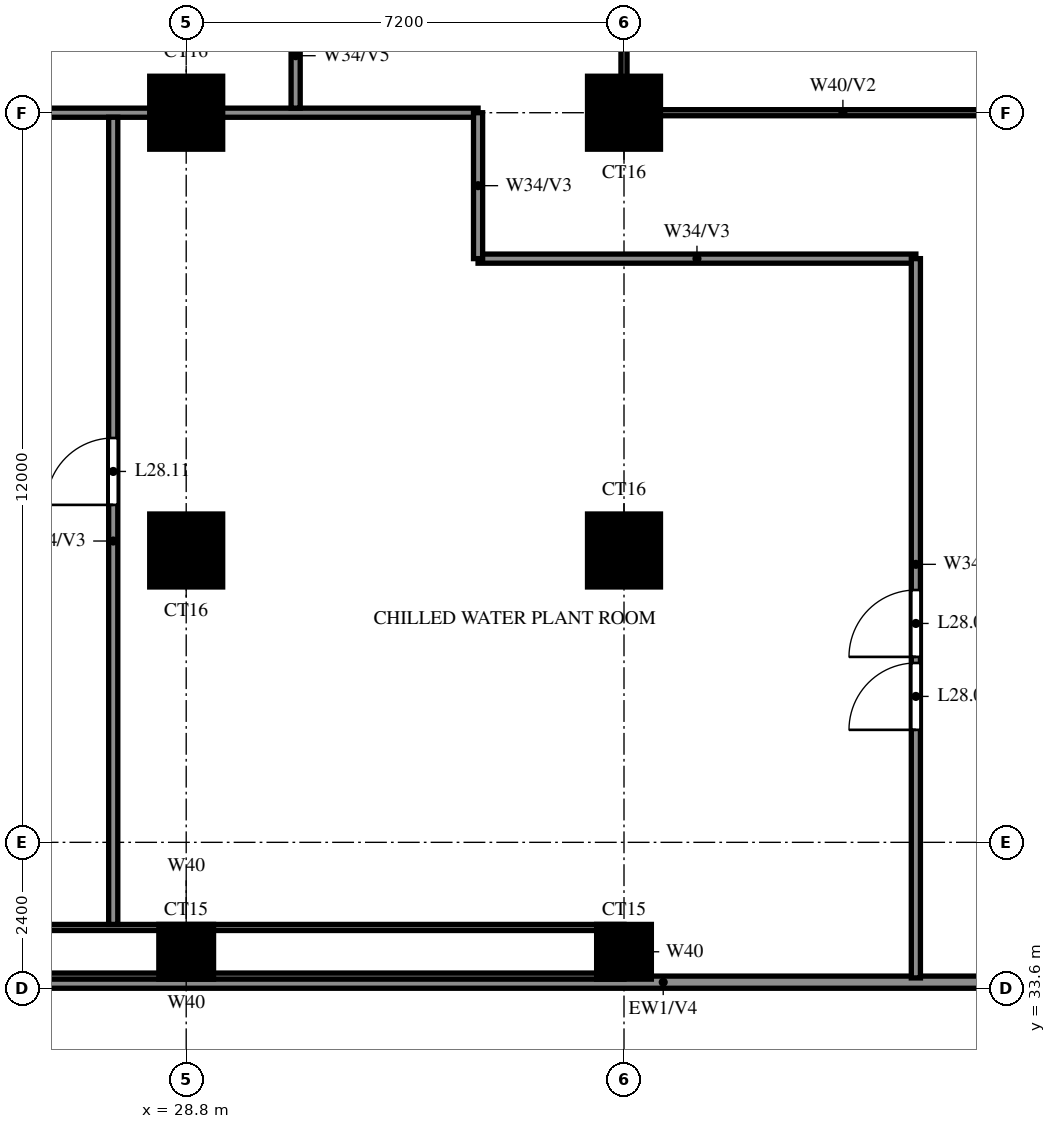
"""IFC4 building model, lengths in metres.
Left out: names, types, materials, properties, quantities, classifications, styles, units other than length and angle.
Written with IfcOpenShell. Run it as: python <this file> out.ifc"""

import sys

from ifc_helpers import new_model, si_unit, direction, frame, frame_2d, origin, origin_2d, place, context, subcontext, project, spatial, rectangle, extrude, source, transform, mapped, element, fill, save


model = new_model("IFC4")
c1 = context("Model", 3, precision=1e-05, world=origin(), true_north=direction((0.0, 1.0)))
c2 = subcontext(c1, "Body", "Model", "MODEL_VIEW")
j1 = project(units=[si_unit("LENGTHUNIT", "METRE"), si_unit("PLANEANGLEUNIT", "RADIAN")], contexts=[c1])
p1 = place(None, origin())
s1 = spatial("IfcSite", under=j1, at=p1, CompositionType="ELEMENT")
p2 = place(p1, origin())
s2 = spatial("IfcBuilding", under=s1, at=p2, CompositionType="ELEMENT")
p3 = place(p2, frame((0.0, 0.0, 107.5)))
s3 = spatial("IfcBuildingStorey", under=s2, at=p3, CompositionType="ELEMENT", Elevation=107.5)
m1 = source(origin(), c2, "Body", "SweptSolid", [
    extrude(rectangle(XDim=0.9, YDim=0.9, at=origin_2d()), origin(), (0.0, 0.0, 1.0), 5.2),
])
for number, where, z_axis, x_axis in (
    (1, (28.8, 34.2, 0.0), (0.0, 0.0, 1.0), (1.0, 0.0, 0.0)),
    (2, (36.0, 34.2, 0.0), (0.0, 0.0, 1.0), (1.0, 0.0, 0.0)),
):
    element("IfcColumn", number, at=place(p3, frame(where, z_axis=z_axis, x_axis=x_axis)), inside=s3, PredefinedType="COLUMN", context=c2, shape_type="MappedRepresentation", body=[
        mapped(m1, transform((0.0, 0.0, 0.0))),
    ])
m2 = source(origin(), c2, "Body", "SweptSolid", [
    extrude(rectangle(XDim=1.2, YDim=1.2, at=origin_2d()), origin(), (0.0, 0.0, 1.0), 5.2),
])
for number, where, z_axis, x_axis in (
    (3, (28.8, 40.8, 0.0), (0.0, 0.0, 1.0), (1.0, 0.0, 0.0)),
    (4, (36.0, 40.8, 0.0), (0.0, 0.0, 1.0), (1.0, 0.0, 0.0)),
    (5, (28.8, 48.0, 0.0), (0.0, 0.0, 1.0), (1.0, 0.0, 0.0)),
    (6, (36.0, 48.0, 0.0), (0.0, 0.0, 1.0), (1.0, 0.0, 0.0)),
):
    element("IfcColumn", number, at=place(p3, frame(where, z_axis=z_axis, x_axis=x_axis)), inside=s3, PredefinedType="COLUMN", context=c2, shape_type="MappedRepresentation", body=[
        mapped(m2, transform((0.0, 0.0, 0.0))),
    ])
p4 = place(p3, frame((18.2, 33.7, 0.0), z_axis=(0.0, 0.0, 1.0), x_axis=(1.0, 0.0, 0.0)))
e7 = element("IfcWall", 7, at=p4, inside=s3, PredefinedType="SOLIDWALL", context=c2, shape_type="SweptSolid", body=[
    extrude(rectangle(XDim=23.8, YDim=0.2, at=frame_2d((11.9, 0.0))), origin(), (0.0, 0.0, 1.0), 5.2),
])
for number, where, z_axis, x_axis in (
    (8, (21.6, 33.8, 0.0), (0.0, 0.0, 1.0), (1.0, 0.0, 0.0)),
    (9, (21.6, 34.6, 0.0), (0.0, 0.0, 1.0), (1.0, 0.0, 0.0)),
):
    element("IfcWall", number, at=place(p3, frame(where, z_axis=z_axis, x_axis=x_axis)), inside=s3, PredefinedType="PARTITIONING", context=c2, shape_type="SweptSolid", body=[
        extrude(rectangle(XDim=14.4, YDim=0.1, at=frame_2d((7.2, 0.0))), origin(), (0.0, 0.0, 1.0), 5.2),
    ])
p5 = place(p3, frame((33.6, 45.6, 0.0), z_axis=(0.0, 0.0, 1.0), x_axis=(1.0, 0.0, 0.0)))
e10 = element("IfcWall", 10, at=p5, inside=s3, PredefinedType="PARTITIONING", context=c2, shape_type="SweptSolid", body=[
    extrude(rectangle(XDim=7.2, YDim=0.15, at=frame_2d((3.6, 0.0))), origin(), (0.0, 0.0, 1.0), 4.3),
])
p6 = place(p3, frame((36.0, 48.0, 0.0), z_axis=(0.0, 0.0, 1.0), x_axis=(1.0, 0.0, 0.0)))
e11 = element("IfcWall", 11, at=p6, inside=s3, PredefinedType="PARTITIONING", context=c2, shape_type="SweptSolid", body=[
    extrude(rectangle(XDim=7.2, YDim=0.1, at=frame_2d((3.6, 0.0))), origin(), (0.0, 0.0, 1.0), 4.3),
])
p7 = place(p3, frame((15.45, 48.0, 0.0), z_axis=(0.0, 0.0, 1.0), x_axis=(1.0, 0.0, 0.0)))
e12 = element("IfcWall", 12, at=p7, inside=s3, PredefinedType="PARTITIONING", context=c2, shape_type="SweptSolid", body=[
    extrude(rectangle(XDim=18.15, YDim=0.15, at=frame_2d((9.075, 0.0))), origin(), (0.0, 0.0, 1.0), 4.3),
])
p8 = place(p3, frame((27.6, 34.65, 0.0), z_axis=(0.0, 0.0, 1.0), x_axis=(0.0, 1.0, 0.0)))
e13 = element("IfcWall", 13, at=p8, inside=s3, PredefinedType="PARTITIONING", context=c2, shape_type="SweptSolid", body=[
    extrude(rectangle(XDim=13.275, YDim=0.15, at=frame_2d((6.638, 0.0))), origin(), (0.0, 0.0, 1.0), 4.3),
])
p9 = place(p8, frame((6.9, 0.0, 0.0)))
e14 = element("IfcOpeningElement", 14, at=p9, cuts=e13, PredefinedType="OPENING", context=c2, shape_type="SweptSolid", body=[
    extrude(rectangle(XDim=1.1, YDim=2.1, at=frame_2d((0.55, 1.05))), frame((0.0, 0.085, 0.0), z_axis=(0.0, -1.0, 0.0), x_axis=(1.0, 0.0, 0.0)), (0.0, 0.0, 1.0), 0.17),
])
p10 = place(p3, frame((30.6, 48.075, 0.0), z_axis=(0.0, 0.0, 1.0), x_axis=(0.0, 1.0, 0.0)))
e15 = element("IfcWall", 15, at=p10, inside=s3, PredefinedType="PARTITIONING", context=c2, shape_type="SweptSolid", body=[
    extrude(rectangle(XDim=1.725, YDim=0.15, at=frame_2d((0.863, 0.0))), origin(), (0.0, 0.0, 1.0), 5.2),
])
p11 = place(p3, frame((33.6, 45.6, 0.0), z_axis=(0.0, 0.0, 1.0), x_axis=(0.0, 1.0, 0.0)))
e16 = element("IfcWall", 16, at=p11, inside=s3, PredefinedType="PARTITIONING", context=c2, shape_type="SweptSolid", body=[
    extrude(rectangle(XDim=2.4, YDim=0.15, at=frame_2d((1.2, 0.0))), origin(), (0.0, 0.0, 1.0), 4.3),
])
p12 = place(p3, frame((36.0, 33.8, 0.0), z_axis=(0.0, 0.0, 1.0), x_axis=(0.0, 1.0, 0.0)))
e17 = element("IfcWall", 17, at=p12, inside=s3, PredefinedType="PARTITIONING", context=c2, shape_type="SweptSolid", body=[
    extrude(rectangle(XDim=0.8, YDim=0.1, at=frame_2d((0.4, 0.0))), origin(), (0.0, 0.0, 1.0), 5.2),
])
p13 = place(p3, frame((36.0, 48.0, 0.0), z_axis=(0.0, 0.0, 1.0), x_axis=(0.0, 1.0, 0.0)))
e18 = element("IfcWall", 18, at=p13, inside=s3, PredefinedType="PARTITIONING", context=c2, shape_type="SweptSolid", body=[
    extrude(rectangle(XDim=14.4, YDim=0.1, at=frame_2d((7.2, 0.0))), origin(), (0.0, 0.0, 1.0), 4.3),
])
p14 = place(p3, frame((40.8, 33.77, 0.0), z_axis=(0.0, 0.0, 1.0), x_axis=(0.0, 1.0, 0.0)))
e19 = element("IfcWall", 19, at=p14, inside=s3, PredefinedType="PARTITIONING", context=c2, shape_type="SweptSolid", body=[
    extrude(rectangle(XDim=11.83, YDim=0.15, at=frame_2d((5.915, 0.0))), origin(), (0.0, 0.0, 1.0), 4.3),
])
p15 = place(p14, frame((5.28, 0.0, 0.0)))
e20 = element("IfcOpeningElement", 20, at=p15, cuts=e19, PredefinedType="OPENING", context=c2, shape_type="SweptSolid", body=[
    extrude(rectangle(XDim=1.1, YDim=2.1, at=frame_2d((0.55, 1.05))), frame((0.0, 0.085, 0.0), z_axis=(0.0, -1.0, 0.0), x_axis=(1.0, 0.0, 0.0)), (0.0, 0.0, 1.0), 0.17),
])
p16 = place(p14, frame((4.08, 0.0, 0.0)))
e21 = element("IfcOpeningElement", 21, at=p16, cuts=e19, PredefinedType="OPENING", context=c2, shape_type="SweptSolid", body=[
    extrude(rectangle(XDim=1.1, YDim=2.1, at=frame_2d((0.55, 1.05))), frame((0.0, 0.085, 0.0), z_axis=(0.0, -1.0, 0.0), x_axis=(1.0, 0.0, 0.0)), (0.0, 0.0, 1.0), 0.17),
])
p17 = place(p15, origin())
e22 = element("IfcDoor", 22, at=p17, inside=s3, OperationType="SINGLE_SWING_LEFT", PredefinedType="DOOR", context=c2, shape_type="SweptSolid", body=[
    extrude(rectangle(XDim=1.1, YDim=2.1, at=frame_2d((0.55, 1.05))), frame((0.0, 0.025, 0.0), z_axis=(0.0, -1.0, 0.0), x_axis=(1.0, 0.0, 0.0)), (0.0, 0.0, 1.0), 0.05),
])
fill(e20, e22)
p18 = place(p16, origin())
e23 = element("IfcDoor", 23, at=p18, inside=s3, OperationType="SINGLE_SWING_LEFT", PredefinedType="DOOR", context=c2, shape_type="SweptSolid", body=[
    extrude(rectangle(XDim=1.1, YDim=2.1, at=frame_2d((0.55, 1.05))), frame((0.0, 0.025, 0.0), z_axis=(0.0, -1.0, 0.0), x_axis=(1.0, 0.0, 0.0)), (0.0, 0.0, 1.0), 0.05),
])
fill(e21, e23)
p19 = place(p9, origin())
e24 = element("IfcDoor", 24, at=p19, inside=s3, OperationType="SINGLE_SWING_RIGHT", PredefinedType="DOOR", context=c2, shape_type="SweptSolid", body=[
    extrude(rectangle(XDim=1.1, YDim=2.1, at=frame_2d((0.55, 1.05))), frame((0.0, 0.025, 0.0), z_axis=(0.0, -1.0, 0.0), x_axis=(1.0, 0.0, 0.0)), (0.0, 0.0, 1.0), 0.05),
])
fill(e14, e24)
save(model, sys.argv[1])
